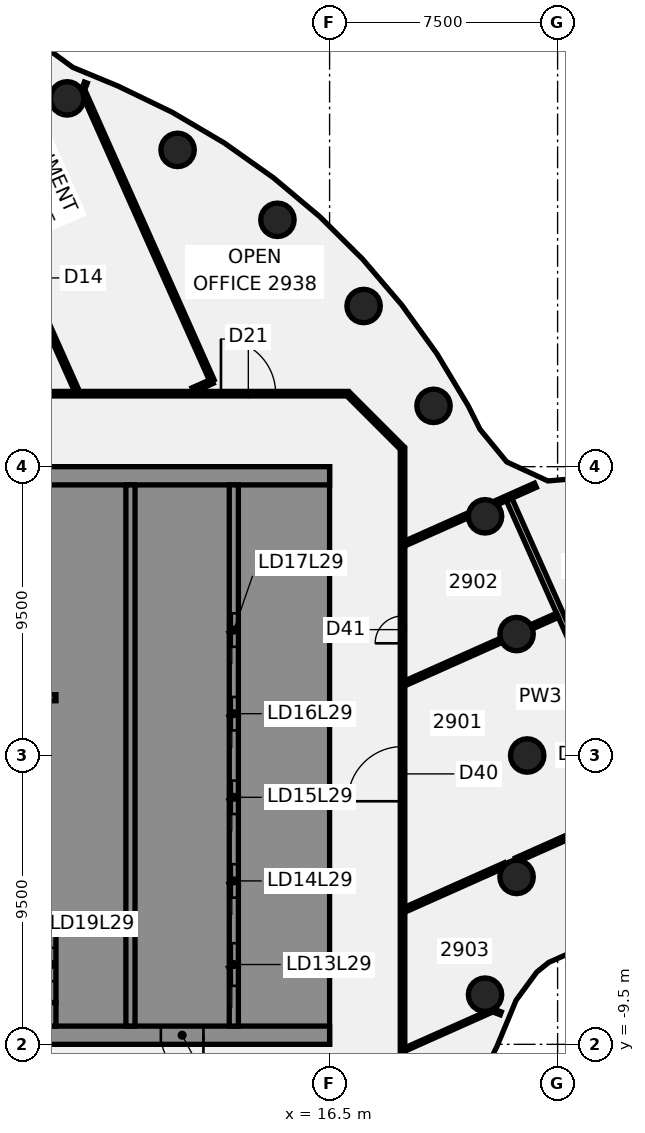
"""IFC4 building model, lengths in metres.
Left out: names, types, materials, properties, quantities, classifications, styles, units other than length and angle.
Written with IfcOpenShell. Run it as: python <this file> out.ifc"""

import sys

from ifc_helpers import new_model, si_unit, direction, frame, frame_2d, origin, origin_2d, place, context, subcontext, project, spatial, polyline, rectangle, circle, outline, extrude, element, fill, save


model = new_model("IFC4")
c1 = context("Model", 3, precision=1e-05, world=origin(), true_north=direction((0.0, 1.0)))
c2 = subcontext(c1, "Body", "Model", "MODEL_VIEW")
j1 = project(units=[si_unit("LENGTHUNIT", "METRE"), si_unit("PLANEANGLEUNIT", "RADIAN")], contexts=[c1])
p1 = place(None, origin())
s1 = spatial("IfcSite", under=j1, at=p1, CompositionType="ELEMENT")
p2 = place(p1, origin())
s2 = spatial("IfcBuilding", under=s1, at=p2, CompositionType="ELEMENT")
p3 = place(p2, frame((0.0, 0.0, 121.0)))
s3 = spatial("IfcBuildingStorey", under=s2, at=p3, CompositionType="ELEMENT", Elevation=121.0)
for number, where, z_axis, x_axis in (
    (1, (23.0, 0.0, -0.14), (0.0, 0.0, 1.0), (1.0, 0.0, 0.0)),
    (2, (22.651, 3.994, -0.14), (0.0, 0.0, 1.0), (1.0, 0.0, 0.0)),
    (3, (21.613, 7.866, -0.14), (0.0, 0.0, 1.0), (1.0, 0.0, 0.0)),
    (4, (19.919, 11.5, -0.14), (0.0, 0.0, 1.0), (1.0, 0.0, 0.0)),
    (5, (17.619, 14.784, -0.14), (0.0, 0.0, 1.0), (1.0, 0.0, 0.0)),
    (6, (14.784, 17.619, -0.14), (0.0, 0.0, 1.0), (1.0, 0.0, 0.0)),
    (7, (11.5, 19.919, -0.14), (0.0, 0.0, 1.0), (1.0, 0.0, 0.0)),
    (8, (7.866, 21.613, -0.14), (0.0, 0.0, 1.0), (1.0, 0.0, 0.0)),
    (9, (21.613, -7.866, -0.14), (0.0, 0.0, 1.0), (1.0, 0.0, 0.0)),
    (10, (22.651, -3.994, -0.14), (0.0, 0.0, 1.0), (1.0, 0.0, 0.0)),
):
    element("IfcColumn", number, at=place(p3, frame(where, z_axis=z_axis, x_axis=x_axis)), inside=s3, PredefinedType="COLUMN", context=c2, shape_type="SweptSolid", body=[
        extrude(circle(Radius=0.55, at=origin_2d()), origin(), (0.0, 0.0, 1.0), 3.75),
    ])
p4 = place(p3, frame((3.596, 22.283, 0.0), z_axis=(0.0, 0.0, 1.0), x_axis=(0.407231277155, -0.91332507187, 0.0)))
e11 = element("IfcWall", 11, at=p4, inside=s3, PredefinedType="PARTITIONING", context=c2, shape_type="SweptSolid", body=[
    extrude(rectangle(XDim=11.273, YDim=0.15, at=frame_2d((5.637, 0.0))), origin(), (0.0, 0.0, 1.0), 3.01),
])
p5 = place(p4, frame((6.75, 0.0, 0.0)))
e12 = element("IfcOpeningElement", 12, at=p5, cuts=e11, PredefinedType="OPENING", context=c2, shape_type="SweptSolid", body=[
    extrude(rectangle(XDim=0.9, YDim=2.1, at=frame_2d((0.45, 1.05))), frame((0.0, 0.085, 0.0), z_axis=(0.0, -1.0, 0.0), x_axis=(1.0, 0.0, 0.0)), (0.0, 0.0, 1.0), 0.17),
])
p6 = place(p3, frame((8.39, 21.845, 0.0), z_axis=(0.0, 0.0, 1.0), x_axis=(0.407183718185, -0.91334627587, 0.0)))
e13 = element("IfcWall", 13, at=p6, inside=s3, PredefinedType="PARTITIONING", context=c2, shape_type="SweptSolid", body=[
    extrude(rectangle(XDim=10.421, YDim=0.15, at=frame_2d((5.211, 0.0))), origin(), (0.0, 0.0, 1.0), 3.01),
])
p7 = place(p3, frame((22.409, 8.416, 0.0), z_axis=(0.0, 0.0, 1.0), x_axis=(0.40714663268, -0.913362808251, 0.0)))
e14 = element("IfcWall", 14, at=p7, inside=s3, PredefinedType="PARTITIONING", context=c2, shape_type="SweptSolid", body=[
    extrude(rectangle(XDim=14.219, YDim=0.2, at=frame_2d((7.11, 0.0))), origin(), (0.0, 0.0, 1.0), 3.01),
])
p8 = place(p7, frame((6.621, 0.0, 0.0)))
e15 = element("IfcOpeningElement", 15, at=p8, cuts=e14, PredefinedType="OPENING", context=c2, shape_type="SweptSolid", body=[
    extrude(rectangle(XDim=1.4, YDim=2.1, at=frame_2d((0.7, 1.05))), frame((0.0, 0.11, 0.0), z_axis=(0.0, -1.0, 0.0), x_axis=(1.0, 0.0, 0.0)), (0.0, 0.0, 1.0), 0.22),
])
p9 = place(p3, frame((17.128, 11.872, 0.0), z_axis=(0.0, 0.0, 1.0), x_axis=(0.707106781187, -0.707106781187, 0.0)))
e16 = element("IfcWall", 16, at=p9, inside=s3, PredefinedType="PARTITIONING", context=c2, shape_type="SweptSolid", body=[
    extrude(rectangle(XDim=2.465, YDim=0.15, at=frame_2d((1.232, 0.0))), origin(), (0.0, 0.0, 1.0), 3.01),
])
p10 = place(p3, frame((21.923, -8.402, 0.0), z_axis=(0.0, 0.0, 1.0), x_axis=(0.934418057451, -0.356178177193, 0.0)))
e17 = element("IfcWall", 17, at=p10, inside=s3, PredefinedType="PARTITIONING", context=c2, shape_type="SweptSolid", body=[
    extrude(rectangle(XDim=0.222, YDim=0.1, at=frame_2d((0.111, 0.0))), origin(), (0.0, 0.0, 1.0), 3.01),
])
p11 = place(p3, frame((-17.065, 11.9, 0.0), z_axis=(0.0, 0.0, 1.0), x_axis=(1.0, 0.0, 0.0)))
e18 = element("IfcWall", 18, at=p11, inside=s3, PredefinedType="PARTITIONING", context=c2, shape_type="SweptSolid", body=[
    extrude(rectangle(XDim=34.165, YDim=0.15, at=frame_2d((17.083, 0.0))), origin(), (0.0, 0.0, 1.0), 3.01),
])
p12 = place(p11, frame((20.696, 0.0, 0.0)))
e19 = element("IfcOpeningElement", 19, at=p12, cuts=e18, PredefinedType="OPENING", context=c2, shape_type="SweptSolid", body=[
    extrude(rectangle(XDim=1.8, YDim=2.1, at=frame_2d((0.9, 1.05))), frame((0.0, 0.085, 0.0), z_axis=(0.0, -1.0, 0.0), x_axis=(1.0, 0.0, 0.0)), (0.0, 0.0, 1.0), 0.17),
])
p13 = place(p11, frame((29.992, 0.0, 0.0)))
e20 = element("IfcOpeningElement", 20, at=p13, cuts=e18, PredefinedType="OPENING", context=c2, shape_type="SweptSolid", body=[
    extrude(rectangle(XDim=1.8, YDim=2.1, at=frame_2d((0.9, 1.05))), frame((0.0, 0.085, 0.0), z_axis=(0.0, -1.0, 0.0), x_axis=(1.0, 0.0, 0.0)), (0.0, 0.0, 1.0), 0.17),
])
p14 = place(p11, frame((5.815, 0.0, 0.0)))
e21 = element("IfcOpeningElement", 21, at=p14, cuts=e18, PredefinedType="OPENING", context=c2, shape_type="SweptSolid", body=[
    extrude(rectangle(XDim=1.8, YDim=2.1, at=frame_2d((0.9, 1.05))), frame((0.0, 0.085, 0.0), z_axis=(0.0, -1.0, 0.0), x_axis=(1.0, 0.0, 0.0)), (0.0, 0.0, 1.0), 0.17),
])
p15 = place(p3, frame((12.006, 12.024, 0.0), z_axis=(0.0, 0.0, 1.0), x_axis=(0.913247290994, 0.407405676803, 0.0)))
e22 = element("IfcWall", 22, at=p15, inside=s3, PredefinedType="PARTITIONING", context=c2, shape_type="SweptSolid", body=[
    extrude(rectangle(XDim=0.697, YDim=0.15, at=frame_2d((0.349, 0.0))), origin(), (0.0, 0.0, 1.0), 3.01),
])
p16 = place(p3, frame((18.978, -9.668, 0.0), z_axis=(0.0, 0.0, 1.0), x_axis=(0.913444648298, 0.406962989099, 0.0)))
e23 = element("IfcWall", 23, at=p16, inside=s3, PredefinedType="PARTITIONING", context=c2, shape_type="SweptSolid", body=[
    extrude(rectangle(XDim=3.214, YDim=0.1, at=frame_2d((1.607, 0.0))), origin(), (0.0, 0.0, 1.0), 3.01),
])
p17 = place(p3, frame((18.987, -5.066, 0.0), z_axis=(0.0, 0.0, 1.0), x_axis=(0.913319907559, 0.407242859307, 0.0)))
e24 = element("IfcWall", 24, at=p17, inside=s3, PredefinedType="PARTITIONING", context=c2, shape_type="SweptSolid", body=[
    extrude(rectangle(XDim=3.609, YDim=0.15, at=frame_2d((1.804, 0.0))), origin(), (0.0, 0.0, 1.0), 3.01),
])
p18 = place(p3, frame((22.644, -3.436, 0.0), z_axis=(0.0, 0.0, 1.0), x_axis=(0.913319316441, 0.407244185, 0.0)))
e25 = element("IfcWall", 25, at=p18, inside=s3, PredefinedType="PARTITIONING", context=c2, shape_type="SweptSolid", body=[
    extrude(rectangle(XDim=4.506, YDim=0.15, at=frame_2d((2.253, 0.0))), origin(), (0.0, 0.0, 1.0), 3.01),
])
p19 = place(p18, frame((2.4, 0.0, 0.0)))
e26 = element("IfcOpeningElement", 26, at=p19, cuts=e25, PredefinedType="OPENING", context=c2, shape_type="SweptSolid", body=[
    extrude(rectangle(XDim=0.9, YDim=2.1, at=frame_2d((0.45, 1.05))), frame((0.0, 0.085, 0.0), z_axis=(0.0, -1.0, 0.0), x_axis=(1.0, 0.0, 0.0)), (0.0, 0.0, 1.0), 0.17),
])
p20 = place(p3, frame((18.987, 2.379, 0.0), z_axis=(0.0, 0.0, 1.0), x_axis=(0.913278113034, 0.407336578585, 0.0)))
e27 = element("IfcWall", 27, at=p20, inside=s3, PredefinedType="PARTITIONING", context=c2, shape_type="SweptSolid", body=[
    extrude(rectangle(XDim=3.459, YDim=0.15, at=frame_2d((1.729, 0.0))), origin(), (0.0, 0.0, 1.0), 3.01),
])
p21 = place(p3, frame((23.146, 4.234, 0.0), z_axis=(0.0, 0.0, 1.0), x_axis=(0.913268856535, 0.407357331692, 0.0)))
e28 = element("IfcWall", 28, at=p21, inside=s3, PredefinedType="PARTITIONING", context=c2, shape_type="SweptSolid", body=[
    extrude(rectangle(XDim=0.929, YDim=0.15, at=frame_2d((0.464, 0.0))), origin(), (0.0, 0.0, 1.0), 3.01),
])
p22 = place(p3, frame((18.987, 6.978, 0.0), z_axis=(0.0, 0.0, 1.0), x_axis=(0.913336978185, 0.407204573009, 0.0)))
e29 = element("IfcWall", 29, at=p22, inside=s3, PredefinedType="PARTITIONING", context=c2, shape_type="SweptSolid", body=[
    extrude(rectangle(XDim=2.273, YDim=0.15, at=frame_2d((1.136, 0.0))), origin(), (0.0, 0.0, 1.0), 3.01),
])
p23 = place(p3, frame((21.947, 8.298, 0.0), z_axis=(0.0, 0.0, 1.0), x_axis=(0.913324742131, 0.407232016683, 0.0)))
e30 = element("IfcWall", 30, at=p23, inside=s3, PredefinedType="PARTITIONING", context=c2, shape_type="SweptSolid", body=[
    extrude(rectangle(XDim=1.45, YDim=0.15, at=frame_2d((0.725, 0.0))), origin(), (0.0, 0.0, 1.0), 3.01),
])
p24 = place(p3, frame((8.381, 21.867, 0.0), z_axis=(0.0, 0.0, 1.0), x_axis=(0.355671431092, 0.934611059803, 0.0)))
e31 = element("IfcWall", 31, at=p24, inside=s3, PredefinedType="PARTITIONING", context=c2, shape_type="SweptSolid", body=[
    extrude(rectangle(XDim=0.282, YDim=0.1, at=frame_2d((0.141, 0.0))), origin(), (0.0, 0.0, 1.0), 3.01),
])
p25 = place(p3, frame((18.9, -10.1, 0.0), z_axis=(0.0, 0.0, 1.0), x_axis=(0.0, 1.0, 0.0)))
e32 = element("IfcWall", 32, at=p25, inside=s3, PredefinedType="PARTITIONING", context=c2, shape_type="SweptSolid", body=[
    extrude(rectangle(XDim=20.2, YDim=0.15, at=frame_2d((10.1, 0.0))), origin(), (0.0, 0.0, 1.0), 3.01),
])
p26 = place(p25, frame((8.595, 0.0, 0.0)))
e33 = element("IfcOpeningElement", 33, at=p26, cuts=e32, PredefinedType="OPENING", context=c2, shape_type="SweptSolid", body=[
    extrude(rectangle(XDim=1.8, YDim=2.1, at=frame_2d((0.9, 1.05))), frame((0.0, 0.085, 0.0), z_axis=(0.0, -1.0, 0.0), x_axis=(1.0, 0.0, 0.0)), (0.0, 0.0, 1.0), 0.17),
])
p27 = place(p25, frame((13.79, 0.0, 0.0)))
e34 = element("IfcOpeningElement", 34, at=p27, cuts=e32, PredefinedType="OPENING", context=c2, shape_type="SweptSolid", body=[
    extrude(rectangle(XDim=0.9, YDim=2.1, at=frame_2d((0.45, 1.05))), frame((0.0, 0.085, 0.0), z_axis=(0.0, -1.0, 0.0), x_axis=(1.0, 0.0, 0.0)), (0.0, 0.0, 1.0), 0.17),
])
p28 = place(p3, frame((16.5, -9.2, 0.0), z_axis=(0.0, 0.0, 1.0), x_axis=(-1.0, 0.0, 0.0)))
e35 = element("IfcWall", 35, at=p28, inside=s3, PredefinedType="SHEAR", context=c2, shape_type="SweptSolid", body=[
    extrude(rectangle(XDim=13.0, YDim=0.6, at=frame_2d((6.5, 0.0))), origin(), (0.0, 0.0, 1.0), 3.61),
])
p29 = place(p28, frame((4.15, 0.0, 0.0)))
e36 = element("IfcOpeningElement", 36, at=p29, cuts=e35, PredefinedType="OPENING", context=c2, shape_type="SweptSolid", body=[
    extrude(rectangle(XDim=1.4, YDim=2.1, at=frame_2d((0.7, 1.05))), frame((0.0, 0.31, 0.0), z_axis=(0.0, -1.0, 0.0), x_axis=(1.0, 0.0, 0.0)), (0.0, 0.0, 1.0), 0.62),
])
p30 = place(p28, frame((10.125, 0.0, 0.0)))
e37 = element("IfcOpeningElement", 37, at=p30, cuts=e35, PredefinedType="OPENING", context=c2, shape_type="SweptSolid", body=[
    extrude(rectangle(XDim=1.4, YDim=2.1, at=frame_2d((0.7, 1.05))), frame((0.0, 0.31, 0.0), z_axis=(0.0, -1.0, 0.0), x_axis=(1.0, 0.0, 0.0)), (0.0, 0.0, 1.0), 0.62),
])
p31 = place(p3, origin())
e38 = element("IfcWall", 38, at=p31, inside=s3, PredefinedType="SHEAR", context=c2, shape_type="SweptSolid", body=[
    extrude(outline(polyline([(13.5, -8.9), (15.9, -8.9), (16.5, -8.9), (16.5, 8.9), (15.9, 8.9), (13.5, 8.9), (13.5, 8.125), (15.9, 8.125), (15.9, 5.625), (13.5, 5.625), (13.5, 5.375), (15.9, 5.375), (15.9, 2.875), (13.5, 2.875), (13.5, 2.625), (15.9, 2.625), (15.9, 0.125), (13.5, 0.125), (13.5, -0.125), (15.9, -0.125), (15.9, -2.625), (13.5, -2.625), (13.5, -2.875), (15.9, -2.875), (15.9, -5.375), (13.5, -5.375), (13.5, -5.625), (15.9, -5.625), (15.9, -8.125), (13.5, -8.125), (13.5, -8.9)])), origin(), (0.0, 0.0, 1.0), 3.61),
])
p32 = place(p3, frame((16.5, 9.2, 0.0), z_axis=(0.0, 0.0, 1.0), x_axis=(-1.0, 0.0, 0.0)))
e39 = element("IfcWall", 39, at=p32, inside=s3, PredefinedType="SHEAR", context=c2, shape_type="SweptSolid", body=[
    extrude(rectangle(XDim=13.0, YDim=0.6, at=frame_2d((6.5, 0.0))), origin(), (0.0, 0.0, 1.0), 3.61),
])
p33 = place(p3, origin())
e40 = element("IfcWall", 40, at=p33, inside=s3, PredefinedType="SHEAR", context=c2, shape_type="SweptSolid", body=[
    extrude(outline(polyline([(9.8, -5.375), (7.5, -5.375), (7.5, -2.875), (9.8, -2.875), (9.8, -2.625), (7.5, -2.625), (7.5, -0.125), (9.8, -0.125), (9.8, 0.125), (7.5, 0.125), (7.5, 2.625), (9.8, 2.625), (9.8, 2.875), (7.5, 2.875), (7.5, 5.375), (9.8, 5.375), (9.8, 5.625), (7.5, 5.625), (7.5, 8.125), (9.8, 8.125), (9.8, 8.9), (7.5, 8.9), (7.2, 8.9), (7.2, -5.625), (7.5, -5.625), (9.8, -5.625), (9.8, -5.375)])), origin(), (0.0, 0.0, 1.0), 3.61),
])
p34 = place(p3, origin())
e41 = element("IfcWall", 41, at=p34, inside=s3, PredefinedType="SHEAR", context=c2, shape_type="SweptSolid", body=[
    extrude(outline(polyline([(7.5, -8.125), (7.5, -8.9), (9.8, -8.9), (9.8, -8.125), (9.8, -5.625), (9.55, -5.625), (9.55, -8.125), (7.5, -8.125)])), origin(), (0.0, 0.0, 1.0), 3.61),
])
p35 = place(p3, frame((7.35, -8.9, 0.0), z_axis=(0.0, 0.0, 1.0), x_axis=(0.0, 1.0, 0.0)))
e42 = element("IfcWall", 42, at=p35, inside=s3, PredefinedType="SHEAR", context=c2, shape_type="SweptSolid", body=[
    extrude(rectangle(XDim=0.775, YDim=0.3, at=frame_2d((0.387, 0.0))), origin(), (0.0, 0.0, 1.0), 3.61),
])
p36 = place(p3, frame((7.5, 1.9, 0.0), z_axis=(0.0, 0.0, 1.0), x_axis=(-1.0, 0.0, 0.0)))
e43 = element("IfcWall", 43, at=p36, inside=s3, PredefinedType="SHEAR", context=c2, shape_type="SweptSolid", body=[
    extrude(rectangle(XDim=3.3, YDim=0.2, at=frame_2d((1.65, 0.0))), origin(), (0.0, 0.0, 1.0), 3.61),
])
p37 = place(p3, frame((13.35, -8.9, 0.0), z_axis=(0.0, 0.0, 1.0), x_axis=(0.0, 1.0, 0.0)))
e44 = element("IfcWall", 44, at=p37, inside=s3, PredefinedType="SHEAR", context=c2, shape_type="SweptSolid", body=[
    extrude(rectangle(XDim=17.8, YDim=0.3, at=frame_2d((8.9, 0.0))), origin(), (0.0, 0.0, 1.0), 3.61),
])
p38 = place(p37, frame((1.325, 0.0, 0.0)))
e45 = element("IfcOpeningElement", 45, at=p38, cuts=e44, PredefinedType="OPENING", context=c2, shape_type="SweptSolid", body=[
    extrude(rectangle(XDim=1.4, YDim=2.1, at=frame_2d((0.7, 1.05))), frame((0.0, 0.16, 0.0), z_axis=(0.0, -1.0, 0.0), x_axis=(1.0, 0.0, 0.0)), (0.0, 0.0, 1.0), 0.32),
])
p39 = place(p37, frame((4.225, 0.0, 0.0)))
e46 = element("IfcOpeningElement", 46, at=p39, cuts=e44, PredefinedType="OPENING", context=c2, shape_type="SweptSolid", body=[
    extrude(rectangle(XDim=1.1, YDim=2.1, at=frame_2d((0.55, 1.05))), frame((0.0, 0.16, 0.0), z_axis=(0.0, -1.0, 0.0), x_axis=(1.0, 0.0, 0.0)), (0.0, 0.0, 1.0), 0.32),
])
p40 = place(p37, frame((6.975, 0.0, 0.0)))
e47 = element("IfcOpeningElement", 47, at=p40, cuts=e44, PredefinedType="OPENING", context=c2, shape_type="SweptSolid", body=[
    extrude(rectangle(XDim=1.1, YDim=2.1, at=frame_2d((0.55, 1.05))), frame((0.0, 0.16, 0.0), z_axis=(0.0, -1.0, 0.0), x_axis=(1.0, 0.0, 0.0)), (0.0, 0.0, 1.0), 0.32),
])
p41 = place(p37, frame((9.725, 0.0, 0.0)))
e48 = element("IfcOpeningElement", 48, at=p41, cuts=e44, PredefinedType="OPENING", context=c2, shape_type="SweptSolid", body=[
    extrude(rectangle(XDim=1.1, YDim=2.1, at=frame_2d((0.55, 1.05))), frame((0.0, 0.16, 0.0), z_axis=(0.0, -1.0, 0.0), x_axis=(1.0, 0.0, 0.0)), (0.0, 0.0, 1.0), 0.32),
])
p42 = place(p37, frame((12.475, 0.0, 0.0)))
e49 = element("IfcOpeningElement", 49, at=p42, cuts=e44, PredefinedType="OPENING", context=c2, shape_type="SweptSolid", body=[
    extrude(rectangle(XDim=1.1, YDim=2.1, at=frame_2d((0.55, 1.05))), frame((0.0, 0.16, 0.0), z_axis=(0.0, -1.0, 0.0), x_axis=(1.0, 0.0, 0.0)), (0.0, 0.0, 1.0), 0.32),
])
p43 = place(p3, frame((9.95, -8.9, 0.0), z_axis=(0.0, 0.0, 1.0), x_axis=(0.0, 1.0, 0.0)))
e50 = element("IfcWall", 50, at=p43, inside=s3, PredefinedType="SHEAR", context=c2, shape_type="SweptSolid", body=[
    extrude(rectangle(XDim=17.8, YDim=0.3, at=frame_2d((8.9, 0.0))), origin(), (0.0, 0.0, 1.0), 3.61),
])
p44 = place(p3, frame((7.35, -8.125, 0.0), z_axis=(0.0, 0.0, 1.0), x_axis=(0.0, 1.0, 0.0)))
e51 = element("IfcWall", 51, at=p44, inside=s3, PredefinedType="SHEAR", context=c2, shape_type="SweptSolid", body=[
    extrude(rectangle(XDim=2.5, YDim=0.3, at=frame_2d((1.25, 0.0))), origin(), (0.0, 0.0, 1.0), 3.61),
])
p45 = place(p44, frame((0.7, 0.0, 0.0)))
e52 = element("IfcOpeningElement", 52, at=p45, cuts=e51, PredefinedType="OPENING", context=c2, shape_type="SweptSolid", body=[
    extrude(rectangle(XDim=1.1, YDim=2.1, at=frame_2d((0.55, 1.05))), frame((0.0, 0.16, 0.0), z_axis=(0.0, -1.0, 0.0), x_axis=(1.0, 0.0, 0.0)), (0.0, 0.0, 1.0), 0.32),
])
p46 = place(p13, origin())
e53 = element("IfcDoor", 53, at=p46, inside=s3, OperationType="DOUBLE_DOOR_SINGLE_SWING", PredefinedType="DOOR", context=c2, shape_type="SweptSolid", body=[
    extrude(rectangle(XDim=1.8, YDim=2.1, at=frame_2d((0.9, 1.05))), frame((0.0, 0.025, 0.0), z_axis=(0.0, -1.0, 0.0), x_axis=(1.0, 0.0, 0.0)), (0.0, 0.0, 1.0), 0.05),
])
fill(e20, e53)
p47 = place(p26, origin())
e54 = element("IfcDoor", 54, at=p47, inside=s3, OperationType="DOUBLE_DOOR_SINGLE_SWING", PredefinedType="DOOR", context=c2, shape_type="SweptSolid", body=[
    extrude(rectangle(XDim=1.8, YDim=2.1, at=frame_2d((0.9, 1.05))), frame((0.0, 0.025, 0.0), z_axis=(0.0, -1.0, 0.0), x_axis=(1.0, 0.0, 0.0)), (0.0, 0.0, 1.0), 0.05),
])
fill(e33, e54)
p48 = place(p27, frame((0.9, 0.0, 0.0), z_axis=(0.0, 0.0, 1.0), x_axis=(-1.0, 0.0, 0.0)))
e55 = element("IfcDoor", 55, at=p48, inside=s3, OperationType="SINGLE_SWING_RIGHT", PredefinedType="DOOR", context=c2, shape_type="SweptSolid", body=[
    extrude(rectangle(XDim=0.9, YDim=2.1, at=frame_2d((0.45, 1.05))), frame((0.0, 0.025, 0.0), z_axis=(0.0, -1.0, 0.0), x_axis=(1.0, 0.0, 0.0)), (0.0, 0.0, 1.0), 0.05),
])
fill(e34, e55)
p49 = place(p29, origin())
e56 = element("IfcDoor", 56, at=p49, inside=s3, OperationType="SINGLE_SWING_LEFT", PredefinedType="DOOR", context=c2, shape_type="SweptSolid", body=[
    extrude(rectangle(XDim=1.4, YDim=2.1, at=frame_2d((0.7, 1.05))), frame((0.0, 0.025, 0.0), z_axis=(0.0, -1.0, 0.0), x_axis=(1.0, 0.0, 0.0)), (0.0, 0.0, 1.0), 0.05),
])
fill(e36, e56)
p50 = place(p38, origin())
e57 = element("IfcDoor", 57, at=p50, inside=s3, OperationType="SLIDING_TO_LEFT", PredefinedType="DOOR", context=c2, shape_type="SweptSolid", body=[
    extrude(rectangle(XDim=1.4, YDim=2.1, at=frame_2d((0.7, 1.05))), frame((0.0, 0.025, 0.0), z_axis=(0.0, -1.0, 0.0), x_axis=(1.0, 0.0, 0.0)), (0.0, 0.0, 1.0), 0.05),
])
fill(e45, e57)
p51 = place(p39, origin())
e58 = element("IfcDoor", 58, at=p51, inside=s3, OperationType="SLIDING_TO_LEFT", PredefinedType="DOOR", context=c2, shape_type="SweptSolid", body=[
    extrude(rectangle(XDim=1.1, YDim=2.1, at=frame_2d((0.55, 1.05))), frame((0.0, 0.025, 0.0), z_axis=(0.0, -1.0, 0.0), x_axis=(1.0, 0.0, 0.0)), (0.0, 0.0, 1.0), 0.05),
])
fill(e46, e58)
p52 = place(p40, origin())
e59 = element("IfcDoor", 59, at=p52, inside=s3, OperationType="SLIDING_TO_LEFT", PredefinedType="DOOR", context=c2, shape_type="SweptSolid", body=[
    extrude(rectangle(XDim=1.1, YDim=2.1, at=frame_2d((0.55, 1.05))), frame((0.0, 0.025, 0.0), z_axis=(0.0, -1.0, 0.0), x_axis=(1.0, 0.0, 0.0)), (0.0, 0.0, 1.0), 0.05),
])
fill(e47, e59)
p53 = place(p41, origin())
e60 = element("IfcDoor", 60, at=p53, inside=s3, OperationType="SLIDING_TO_LEFT", PredefinedType="DOOR", context=c2, shape_type="SweptSolid", body=[
    extrude(rectangle(XDim=1.1, YDim=2.1, at=frame_2d((0.55, 1.05))), frame((0.0, 0.025, 0.0), z_axis=(0.0, -1.0, 0.0), x_axis=(1.0, 0.0, 0.0)), (0.0, 0.0, 1.0), 0.05),
])
fill(e48, e60)
p54 = place(p42, origin())
e61 = element("IfcDoor", 61, at=p54, inside=s3, OperationType="SLIDING_TO_LEFT", PredefinedType="DOOR", context=c2, shape_type="SweptSolid", body=[
    extrude(rectangle(XDim=1.1, YDim=2.1, at=frame_2d((0.55, 1.05))), frame((0.0, 0.025, 0.0), z_axis=(0.0, -1.0, 0.0), x_axis=(1.0, 0.0, 0.0)), (0.0, 0.0, 1.0), 0.05),
])
fill(e49, e61)
save(model, sys.argv[1])
